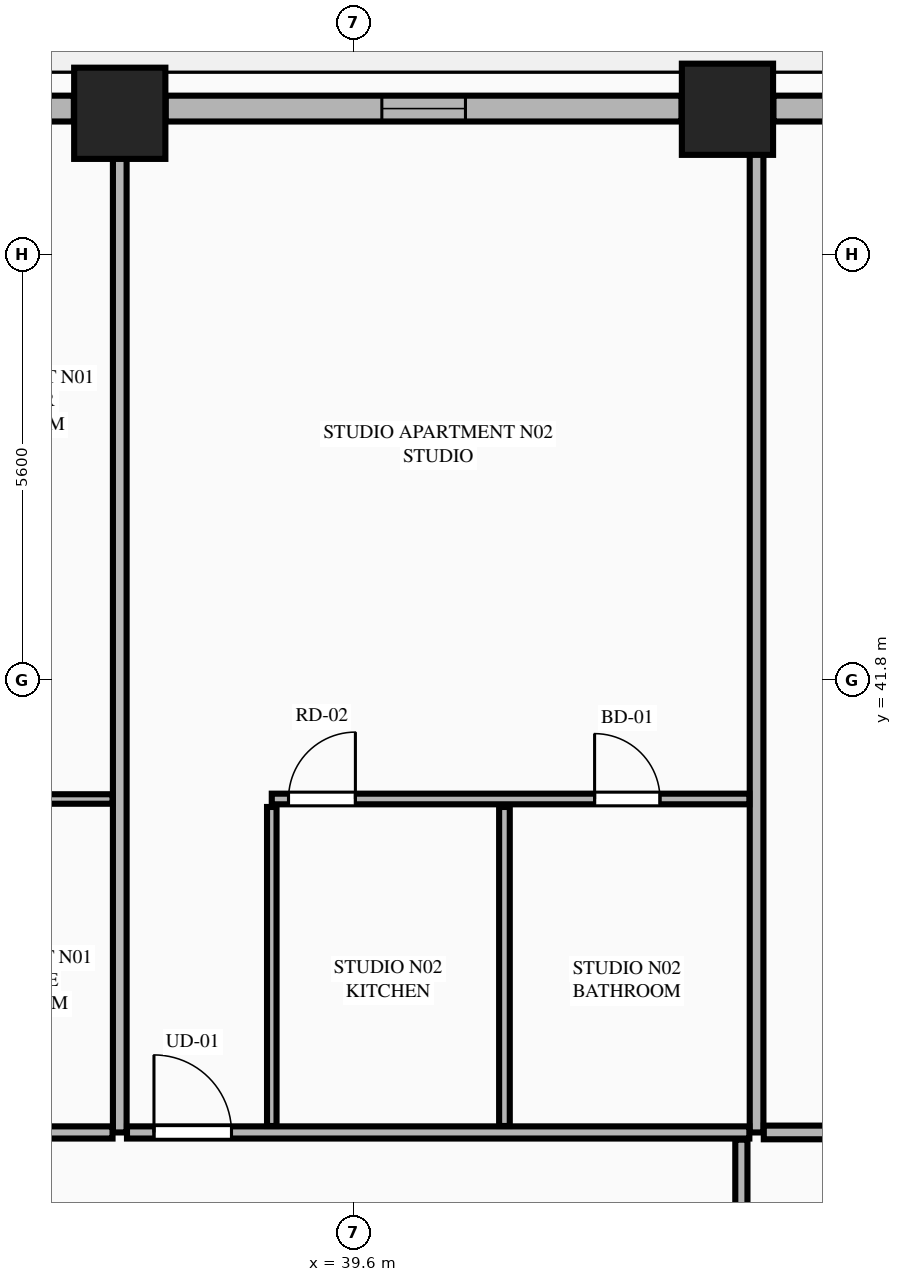
"""IFC4 building model, lengths in metres.
Left out: names, types, materials, properties, quantities, classifications, styles, units other than length and angle.
Written with IfcOpenShell. Run it as: python <this file> out.ifc"""

import sys

from ifc_helpers import new_model, si_unit, direction, frame, frame_2d, origin, origin_2d, place, context, subcontext, project, spatial, rectangle, extrude, element, fill, save


model = new_model("IFC4")
c1 = context("Model", 3, precision=1e-05, world=origin(), true_north=direction((0.0, 1.0)))
c2 = subcontext(c1, "Body", "Model", "MODEL_VIEW")
j1 = project(units=[si_unit("LENGTHUNIT", "METRE"), si_unit("PLANEANGLEUNIT", "RADIAN")], contexts=[c1])
p1 = place(None, origin())
s1 = spatial("IfcSite", under=j1, at=p1, CompositionType="ELEMENT")
p2 = place(p1, origin())
s2 = spatial("IfcBuilding", under=s1, at=p2, CompositionType="ELEMENT")
p3 = place(p2, frame((0.0, 0.0, 67.5)))
s3 = spatial("IfcBuildingStorey", under=s2, at=p3, CompositionType="ELEMENT", Elevation=67.5)
for number, where, z_axis, x_axis in (
    (1, (44.517, 49.311, 0.0), (0.0, 0.0, 1.0), (1.0, 0.0, 0.0)),
    (2, (36.522, 49.258, 0.0), (0.0, 0.0, 1.0), (1.0, 0.0, 0.0)),
):
    element("IfcColumn", number, at=place(p3, frame(where, z_axis=z_axis, x_axis=x_axis)), inside=s3, PredefinedType="COLUMN", context=c2, shape_type="SweptSolid", body=[
        extrude(rectangle(XDim=1.2, YDim=1.2, at=origin_2d()), origin(), (0.0, 0.0, 1.0), 3.55),
    ])
p4 = place(p3, frame((46.366, 49.32, 0.0), z_axis=(0.0, 0.0, 1.0), x_axis=(-1.0, 0.0, 0.0)))
e3 = element("IfcWall", 3, at=p4, inside=s3, PredefinedType="STANDARD", context=c2, shape_type="SweptSolid", body=[
    extrude(rectangle(XDim=1.245, YDim=0.34, at=frame_2d((0.623, 0.0))), origin(), (0.0, 0.0, 1.0), 3.33),
])
p5 = place(p3, frame((43.913, 49.32, 0.0), z_axis=(0.0, 0.0, 1.0), x_axis=(-1.0, 0.0, 0.0)))
e4 = element("IfcWall", 4, at=p5, inside=s3, PredefinedType="STANDARD", context=c2, shape_type="SweptSolid", body=[
    extrude(rectangle(XDim=6.787, YDim=0.34, at=frame_2d((3.394, 0.0))), origin(), (0.0, 0.0, 1.0), 2.787),
])
p6 = place(p5, frame((2.843, 0.0, 0.75)))
e5 = element("IfcOpeningElement", 5, at=p6, cuts=e4, PredefinedType="OPENING", context=c2, shape_type="SweptSolid", body=[
    extrude(rectangle(XDim=1.1, YDim=1.887, at=frame_2d((0.55, 0.943))), frame((0.0, 0.18, 0.0), z_axis=(0.0, -1.0, 0.0), x_axis=(1.0, 0.0, 0.0)), (0.0, 0.0, 1.0), 0.36),
])
p7 = place(p3, frame((35.918, 49.32, 0.0), z_axis=(0.0, 0.0, 1.0), x_axis=(-1.0, 0.0, 0.0)))
e6 = element("IfcWall", 6, at=p7, inside=s3, PredefinedType="STANDARD", context=c2, shape_type="SweptSolid", body=[
    extrude(rectangle(XDim=7.036, YDim=0.34, at=frame_2d((3.518, 0.0))), origin(), (0.0, 0.0, 1.0), 2.787),
])
p8 = place(p7, frame((3.374, 0.0, 0.0)))
e7 = element("IfcOpeningElement", 7, at=p8, cuts=e6, PredefinedType="OPENING", context=c2, shape_type="SweptSolid", body=[
    extrude(rectangle(XDim=1.1, YDim=2.25, at=frame_2d((0.55, 1.125))), frame((0.0, 0.18, 0.0), z_axis=(0.0, -1.0, 0.0), x_axis=(1.0, 0.0, 0.0)), (0.0, 0.0, 1.0), 0.36),
])
p9 = place(p7, frame((0.428, 0.0, 0.75)))
e8 = element("IfcOpeningElement", 8, at=p9, cuts=e6, PredefinedType="OPENING", context=c2, shape_type="SweptSolid", body=[
    extrude(rectangle(XDim=1.1, YDim=1.887, at=frame_2d((0.55, 0.943))), frame((0.0, 0.18, 0.0), z_axis=(0.0, -1.0, 0.0), x_axis=(1.0, 0.0, 0.0)), (0.0, 0.0, 1.0), 0.36),
])
p10 = place(p7, frame((6.013, 0.0, 0.75)))
e9 = element("IfcOpeningElement", 9, at=p10, cuts=e6, PredefinedType="OPENING", context=c2, shape_type="SweptSolid", body=[
    extrude(rectangle(XDim=0.813, YDim=1.887, at=frame_2d((0.406, 0.943))), frame((0.0, 0.18, 0.0), z_axis=(0.0, -1.0, 0.0), x_axis=(1.0, 0.0, 0.0)), (0.0, 0.0, 1.0), 0.36),
])
p11 = place(p3, frame((36.522, 35.85, 0.0), z_axis=(0.0, 0.0, 1.0), x_axis=(0.0, 1.0, 0.0)))
e10 = element("IfcWall", 10, at=p11, inside=s3, PredefinedType="PARTITIONING", context=c2, shape_type="SweptSolid", body=[
    extrude(rectangle(XDim=13.295, YDim=0.18, at=frame_2d((6.647, 0.0))), origin(), (0.0, 0.0, 1.0), 2.636),
])
p12 = place(p3, frame((44.9, 35.85, 0.0), z_axis=(0.0, 0.0, 1.0), x_axis=(0.0, 1.0, 0.0)))
e11 = element("IfcWall", 11, at=p12, inside=s3, PredefinedType="PARTITIONING", context=c2, shape_type="SweptSolid", body=[
    extrude(rectangle(XDim=13.295, YDim=0.18, at=frame_2d((6.647, 0.0))), origin(), (0.0, 0.0, 1.0), 3.33),
])
p13 = place(p3, frame((19.995, 35.85, 0.0), z_axis=(0.0, 0.0, 1.0), x_axis=(1.0, 0.0, 0.0)))
e12 = element("IfcWall", 12, at=p13, inside=s3, PredefinedType="PARTITIONING", context=c2, shape_type="SweptSolid", body=[
    extrude(rectangle(XDim=16.432, YDim=0.16, at=frame_2d((8.216, 0.0))), origin(), (0.0, 0.0, 1.0), 3.33),
])
p14 = place(p13, frame((0.705, 0.0, 0.0)))
e13 = element("IfcOpeningElement", 13, at=p14, cuts=e12, PredefinedType="OPENING", context=c2, shape_type="SweptSolid", body=[
    extrude(rectangle(XDim=1.35, YDim=2.35, at=frame_2d((0.675, 1.175))), frame((0.0, 0.09, 0.0), z_axis=(0.0, -1.0, 0.0), x_axis=(1.0, 0.0, 0.0)), (0.0, 0.0, 1.0), 0.18),
])
p15 = place(p3, frame((30.138, 40.237, 0.0), z_axis=(0.0, 0.0, 1.0), x_axis=(1.0, 0.0, 0.0)))
e14 = element("IfcWall", 14, at=p15, inside=s3, PredefinedType="PARTITIONING", context=c2, shape_type="SweptSolid", body=[
    extrude(rectangle(XDim=6.289, YDim=0.125, at=frame_2d((3.145, 0.0))), origin(), (0.0, 0.0, 1.0), 3.33),
])
p16 = place(p15, frame((4.575, 0.0, 0.0)))
e15 = element("IfcOpeningElement", 15, at=p16, cuts=e14, PredefinedType="OPENING", context=c2, shape_type="SweptSolid", body=[
    extrude(rectangle(XDim=0.86, YDim=2.1, at=frame_2d((0.43, 1.05))), frame((0.0, 0.073, 0.0), z_axis=(0.0, -1.0, 0.0), x_axis=(1.0, 0.0, 0.0)), (0.0, 0.0, 1.0), 0.145),
])
p17 = place(p15, frame((0.3, 0.0, 0.0)))
e16 = element("IfcOpeningElement", 16, at=p17, cuts=e14, PredefinedType="OPENING", context=c2, shape_type="SweptSolid", body=[
    extrude(rectangle(XDim=0.88, YDim=2.15, at=frame_2d((0.44, 1.075))), frame((0.0, 0.073, 0.0), z_axis=(0.0, -1.0, 0.0), x_axis=(1.0, 0.0, 0.0)), (0.0, 0.0, 1.0), 0.145),
])
p18 = place(p3, frame((36.617, 35.85, 0.0), z_axis=(0.0, 0.0, 1.0), x_axis=(1.0, 0.0, 0.0)))
e17 = element("IfcWall", 17, at=p18, inside=s3, PredefinedType="PARTITIONING", context=c2, shape_type="SweptSolid", body=[
    extrude(rectangle(XDim=8.188, YDim=0.16, at=frame_2d((4.094, 0.0))), origin(), (0.0, 0.0, 1.0), 3.33),
])
p19 = place(p18, frame((0.355, 0.0, 0.0)))
e18 = element("IfcOpeningElement", 18, at=p19, cuts=e17, PredefinedType="OPENING", context=c2, shape_type="SweptSolid", body=[
    extrude(rectangle(XDim=1.02, YDim=2.25, at=frame_2d((0.51, 1.125))), frame((0.0, 0.09, 0.0), z_axis=(0.0, -1.0, 0.0), x_axis=(1.0, 0.0, 0.0)), (0.0, 0.0, 1.0), 0.18),
])
p20 = place(p3, frame((38.522, 35.935, 0.0), z_axis=(0.0, 0.0, 1.0), x_axis=(0.0, 1.0, 0.0)))
e19 = element("IfcWall", 19, at=p20, inside=s3, PredefinedType="PARTITIONING", context=c2, shape_type="SweptSolid", body=[
    extrude(rectangle(XDim=4.197, YDim=0.125, at=frame_2d((2.099, 0.0))), origin(), (0.0, 0.0, 1.0), 3.33),
])
p21 = place(p3, frame((38.522, 40.237, 0.0), z_axis=(0.0, 0.0, 1.0), x_axis=(1.0, 0.0, 0.0)))
e20 = element("IfcWall", 20, at=p21, inside=s3, PredefinedType="PLUMBINGWALL", context=c2, shape_type="SweptSolid", body=[
    extrude(rectangle(XDim=6.283, YDim=0.14, at=frame_2d((3.142, 0.0))), origin(), (0.0, 0.0, 1.0), 3.33),
])
p22 = place(p21, frame((4.247, 0.0, 0.0)))
e21 = element("IfcOpeningElement", 21, at=p22, cuts=e20, PredefinedType="OPENING", context=c2, shape_type="SweptSolid", body=[
    extrude(rectangle(XDim=0.86, YDim=2.1, at=frame_2d((0.43, 1.05))), frame((0.0, 0.08, 0.0), z_axis=(0.0, -1.0, 0.0), x_axis=(1.0, 0.0, 0.0)), (0.0, 0.0, 1.0), 0.16),
])
p23 = place(p21, frame((0.22, 0.0, 0.0)))
e22 = element("IfcOpeningElement", 22, at=p23, cuts=e20, PredefinedType="OPENING", context=c2, shape_type="SweptSolid", body=[
    extrude(rectangle(XDim=0.88, YDim=2.15, at=frame_2d((0.44, 1.075))), frame((0.0, 0.08, 0.0), z_axis=(0.0, -1.0, 0.0), x_axis=(1.0, 0.0, 0.0)), (0.0, 0.0, 1.0), 0.16),
])
p24 = place(p3, frame((41.583, 35.935, 0.0), z_axis=(0.0, 0.0, 1.0), x_axis=(0.0, 1.0, 0.0)))
e23 = element("IfcWall", 23, at=p24, inside=s3, PredefinedType="PLUMBINGWALL", context=c2, shape_type="SweptSolid", body=[
    extrude(rectangle(XDim=4.197, YDim=0.14, at=frame_2d((2.099, 0.0))), origin(), (0.0, 0.0, 1.0), 3.33),
])
p25 = place(p3, frame((44.995, 35.85, 0.0), z_axis=(0.0, 0.0, 1.0), x_axis=(1.0, 0.0, 0.0)))
e24 = element("IfcWall", 24, at=p25, inside=s3, PredefinedType="PARTITIONING", context=c2, shape_type="SweptSolid", body=[
    extrude(rectangle(XDim=9.14, YDim=0.18, at=frame_2d((4.57, 0.0))), origin(), (0.0, 0.0, 1.0), 3.33),
])
p26 = place(p3, frame((44.7, 25.0, 0.0), z_axis=(0.0, 0.0, 1.0), x_axis=(0.0, 1.0, 0.0)))
e25 = element("IfcWall", 25, at=p26, inside=s3, PredefinedType="PARTITIONING", context=c2, shape_type="SweptSolid", body=[
    extrude(rectangle(XDim=10.755, YDim=0.16, at=frame_2d((5.377, 0.0))), origin(), (0.0, 0.0, 1.0), 3.33),
])
p27 = place(p26, frame((0.45, 0.0, 0.0)))
e26 = element("IfcOpeningElement", 26, at=p27, cuts=e25, PredefinedType="OPENING", context=c2, shape_type="SweptSolid", body=[
    extrude(rectangle(XDim=1.02, YDim=2.25, at=frame_2d((0.51, 1.125))), frame((0.0, 0.09, 0.0), z_axis=(0.0, -1.0, 0.0), x_axis=(1.0, 0.0, 0.0)), (0.0, 0.0, 1.0), 0.18),
])
p28 = place(p6, origin())
e27 = element("IfcWindow", 27, at=p28, inside=s3, PartitioningType="SINGLE_PANEL", PredefinedType="WINDOW", context=c2, shape_type="SweptSolid", body=[
    extrude(rectangle(XDim=1.1, YDim=1.887, at=frame_2d((0.55, 0.943))), frame((0.0, 0.03, 0.0), z_axis=(0.0, -1.0, 0.0), x_axis=(1.0, 0.0, 0.0)), (0.0, 0.0, 1.0), 0.06),
])
fill(e5, e27)
p29 = place(p22, origin())
e28 = element("IfcDoor", 28, at=p29, inside=s3, OperationType="SINGLE_SWING_LEFT", PredefinedType="DOOR", context=c2, shape_type="SweptSolid", body=[
    extrude(rectangle(XDim=0.86, YDim=2.1, at=frame_2d((0.43, 1.05))), frame((0.0, 0.025, 0.0), z_axis=(0.0, -1.0, 0.0), x_axis=(1.0, 0.0, 0.0)), (0.0, 0.0, 1.0), 0.05),
])
fill(e21, e28)
p30 = place(p19, origin())
e29 = element("IfcDoor", 29, at=p30, inside=s3, OperationType="SINGLE_SWING_LEFT", PredefinedType="DOOR", context=c2, shape_type="SweptSolid", body=[
    extrude(rectangle(XDim=1.02, YDim=2.25, at=frame_2d((0.51, 1.125))), frame((0.0, 0.025, 0.0), z_axis=(0.0, -1.0, 0.0), x_axis=(1.0, 0.0, 0.0)), (0.0, 0.0, 1.0), 0.05),
])
fill(e18, e29)
p31 = place(p23, origin())
e30 = element("IfcDoor", 30, at=p31, inside=s3, OperationType="SINGLE_SWING_RIGHT", PredefinedType="DOOR", context=c2, shape_type="SweptSolid", body=[
    extrude(rectangle(XDim=0.88, YDim=2.15, at=frame_2d((0.44, 1.075))), frame((0.0, 0.025, 0.0), z_axis=(0.0, -1.0, 0.0), x_axis=(1.0, 0.0, 0.0)), (0.0, 0.0, 1.0), 0.05),
])
fill(e22, e30)
save(model, sys.argv[1])
